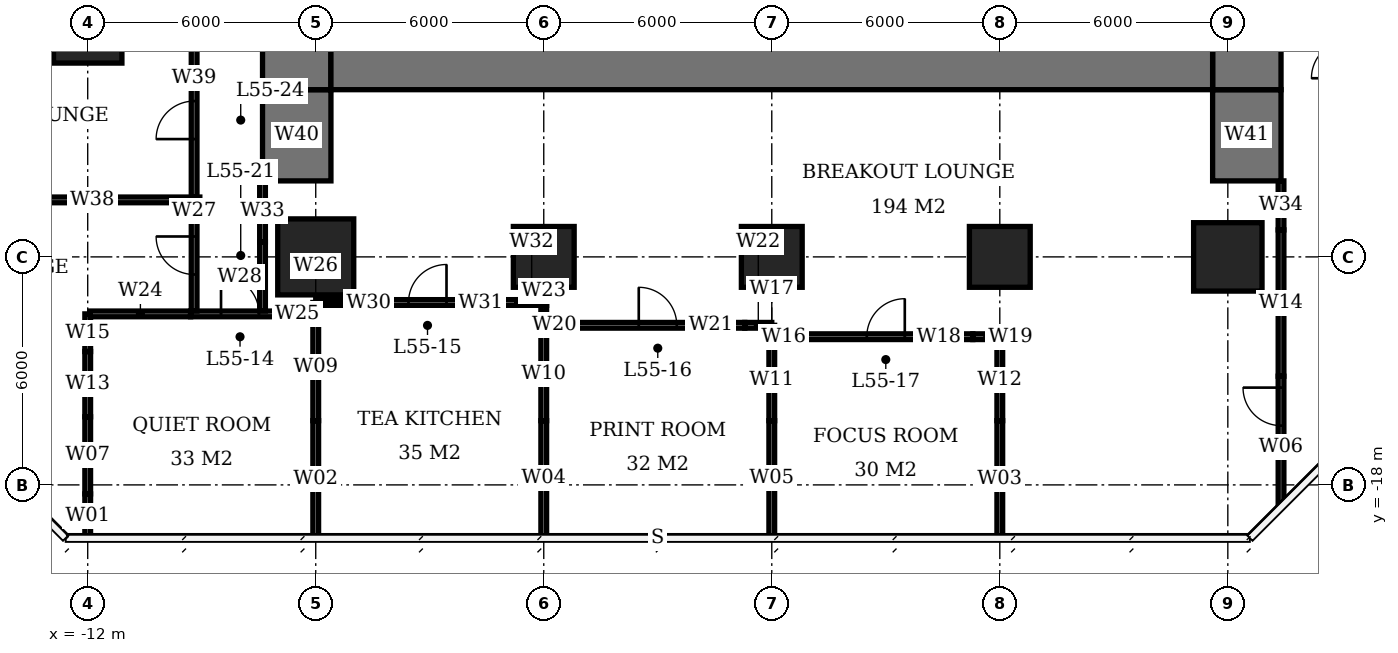
"""IFC4 building model, lengths in metres.
Left out: names, types, materials, properties, quantities, classifications, styles, units other than length and angle.
Written with IfcOpenShell. Run it as: python <this file> out.ifc"""

import sys

from ifc_helpers import new_model, si_unit, direction, frame, frame_2d, origin, origin_2d, place, context, subcontext, project, spatial, rectangle, extrude, element, fill, save


model = new_model("IFC4")
c1 = context("Model", 3, precision=1e-05, world=origin(), true_north=direction((0.0, 1.0)))
c2 = subcontext(c1, "Body", "Model", "MODEL_VIEW")
j1 = project(units=[si_unit("LENGTHUNIT", "METRE"), si_unit("PLANEANGLEUNIT", "RADIAN")], contexts=[c1])
p1 = place(None, origin())
s1 = spatial("IfcSite", under=j1, at=p1, CompositionType="ELEMENT")
p2 = place(p1, origin())
s2 = spatial("IfcBuilding", under=s1, at=p2, CompositionType="ELEMENT")
p3 = place(p2, frame((0.0, 0.0, 224.0)))
s3 = spatial("IfcBuildingStorey", under=s2, at=p3, CompositionType="ELEMENT", Elevation=224.0)
p4 = place(p3, frame((-12.0, -6.0, 0.0), z_axis=(0.0, 0.0, 1.0), x_axis=(1.0, 0.0, 0.0)))
e1 = element("IfcColumn", 1, at=p4, inside=s3, PredefinedType="COLUMN", context=c2, shape_type="SweptSolid", body=[
    extrude(rectangle(XDim=1.8, YDim=1.8, at=origin_2d()), origin(), (0.0, 0.0, 1.0), 3.9),
])
p5 = place(p3, frame((-6.0, -12.0, 0.0), z_axis=(0.0, 0.0, 1.0), x_axis=(1.0, 0.0, 0.0)))
e2 = element("IfcColumn", 2, at=p5, inside=s3, PredefinedType="COLUMN", context=c2, shape_type="SweptSolid", body=[
    extrude(rectangle(XDim=2.0, YDim=2.0, at=origin_2d()), origin(), (0.0, 0.0, 1.0), 3.9),
])
for number, where, z_axis, x_axis in (
    (3, (0.0, -12.0, 0.0), (0.0, 0.0, 1.0), (1.0, 0.0, 0.0)),
    (4, (6.0, -12.0, 0.0), (0.0, 0.0, 1.0), (1.0, 0.0, 0.0)),
    (5, (12.0, -12.0, 0.0), (0.0, 0.0, 1.0), (1.0, 0.0, 0.0)),
):
    element("IfcColumn", number, at=place(p3, frame(where, z_axis=z_axis, x_axis=x_axis)), inside=s3, PredefinedType="COLUMN", context=c2, shape_type="SweptSolid", body=[
        extrude(rectangle(XDim=1.6, YDim=1.6, at=origin_2d()), origin(), (0.0, 0.0, 1.0), 3.9),
    ])
p6 = place(p3, frame((18.0, -12.0, 0.0), z_axis=(0.0, 0.0, 1.0), x_axis=(1.0, 0.0, 0.0)))
e6 = element("IfcColumn", 6, at=p6, inside=s3, PredefinedType="COLUMN", context=c2, shape_type="SweptSolid", body=[
    extrude(rectangle(XDim=1.8, YDim=1.8, at=origin_2d()), origin(), (0.0, 0.0, 1.0), 3.9),
])
p7 = place(p3, frame((-5.6, -6.6, 0.0), z_axis=(0.0, 0.0, 1.0), x_axis=(1.0, 0.0, 0.0)))
e7 = element("IfcWall", 7, at=p7, inside=s3, PredefinedType="SHEAR", context=c2, shape_type="SweptSolid", body=[
    extrude(rectangle(XDim=23.2, YDim=2.0, at=frame_2d((11.6, 0.0))), origin(), (0.0, 0.0, 1.0), 3.9),
])
p8 = place(p3, frame((-6.5, -7.6, 0.0), z_axis=(0.0, 0.0, 1.0), x_axis=(0.0, 1.0, 0.0)))
e8 = element("IfcWall", 8, at=p8, inside=s3, PredefinedType="SHEAR", context=c2, shape_type="SweptSolid", body=[
    extrude(rectangle(XDim=21.2, YDim=1.8, at=frame_2d((10.6, 0.0))), origin(), (0.0, 0.0, 1.0), 3.9),
])
p9 = place(p8, frame((7.8, 0.0, 0.0)))
e9 = element("IfcOpeningElement", 9, at=p9, cuts=e8, PredefinedType="OPENING", context=c2, shape_type="SweptSolid", body=[
    extrude(rectangle(XDim=1.8, YDim=2.4, at=frame_2d((0.9, 1.2))), frame((0.0, 0.91, 0.0), z_axis=(0.0, -1.0, 0.0), x_axis=(1.0, 0.0, 0.0)), (0.0, 0.0, 1.0), 1.82),
])
p10 = place(p3, frame((18.5, -7.6, 0.0), z_axis=(0.0, 0.0, 1.0), x_axis=(0.0, 1.0, 0.0)))
e10 = element("IfcWall", 10, at=p10, inside=s3, PredefinedType="SHEAR", context=c2, shape_type="SweptSolid", body=[
    extrude(rectangle(XDim=21.2, YDim=1.8, at=frame_2d((10.6, 0.0))), origin(), (0.0, 0.0, 1.0), 3.9),
])
p11 = place(p10, frame((9.2, 0.0, 0.0)))
e11 = element("IfcOpeningElement", 11, at=p11, cuts=e10, PredefinedType="OPENING", context=c2, shape_type="SweptSolid", body=[
    extrude(rectangle(XDim=1.8, YDim=2.4, at=frame_2d((0.9, 1.2))), frame((0.0, 0.91, 0.0), z_axis=(0.0, -1.0, 0.0), x_axis=(1.0, 0.0, 0.0)), (0.0, 0.0, 1.0), 1.82),
])
for number, where, z_axis, x_axis in (
    (12, (-6.5, -10.0, 0.0), (0.0, 0.0, 1.0), (0.0, 1.0, 0.0)),
    (13, (18.5, -10.0, 0.0), (0.0, 0.0, 1.0), (0.0, 1.0, 0.0)),
):
    element("IfcWall", number, at=place(p3, frame(where, z_axis=z_axis, x_axis=x_axis)), inside=s3, PredefinedType="SHEAR", context=c2, shape_type="SweptSolid", body=[
        extrude(rectangle(XDim=2.4, YDim=1.8, at=frame_2d((1.2, 0.0))), origin(), (0.0, 0.0, 1.0), 3.9),
    ])
p12 = place(p3, frame((5.925, -14.1, 0.0), z_axis=(0.0, 0.0, 1.0), x_axis=(1.0, 0.0, 0.0)))
e14 = element("IfcWall", 14, at=p12, inside=s3, PredefinedType="PARTITIONING", context=c2, shape_type="SweptSolid", body=[
    extrude(rectangle(XDim=0.785, YDim=0.15, at=frame_2d((0.393, 0.0))), origin(), (0.0, 0.0, 1.0), 2.65),
])
p13 = place(p3, frame((6.71, -14.1, 0.0), z_axis=(0.0, 0.0, 1.0), x_axis=(1.0, 0.0, 0.0)))
e15 = element("IfcWall", 15, at=p13, inside=s3, PredefinedType="PARTITIONING", context=c2, shape_type="SweptSolid", body=[
    extrude(rectangle(XDim=4.58, YDim=0.15, at=frame_2d((2.29, 0.0))), origin(), (0.0, 0.0, 1.0), 3.65),
])
p14 = place(p13, frame((1.79, 0.0, 0.0)))
e16 = element("IfcOpeningElement", 16, at=p14, cuts=e15, PredefinedType="OPENING", context=c2, shape_type="SweptSolid", body=[
    extrude(rectangle(XDim=1.0, YDim=2.1, at=frame_2d((0.5, 1.05))), frame((0.0, 0.085, 0.0), z_axis=(0.0, -1.0, 0.0), x_axis=(1.0, 0.0, 0.0)), (0.0, 0.0, 1.0), 0.17),
])
p15 = place(p3, frame((11.29, -14.1, 0.0), z_axis=(0.0, 0.0, 1.0), x_axis=(1.0, 0.0, 0.0)))
e17 = element("IfcWall", 17, at=p15, inside=s3, PredefinedType="PARTITIONING", context=c2, shape_type="SweptSolid", body=[
    extrude(rectangle(XDim=0.785, YDim=0.15, at=frame_2d((0.393, 0.0))), origin(), (0.0, 0.0, 1.0), 2.65),
])
p16 = place(p3, frame((-0.15, -13.8, 0.0), z_axis=(0.0, 0.0, 1.0), x_axis=(1.0, 0.0, 0.0)))
e18 = element("IfcWall", 18, at=p16, inside=s3, PredefinedType="PARTITIONING", context=c2, shape_type="SweptSolid", body=[
    extrude(rectangle(XDim=0.86, YDim=0.15, at=frame_2d((0.43, 0.0))), origin(), (0.0, 0.0, 1.0), 2.65),
])
p17 = place(p3, frame((0.71, -13.8, 0.0), z_axis=(0.0, 0.0, 1.0), x_axis=(1.0, 0.0, 0.0)))
e19 = element("IfcWall", 19, at=p17, inside=s3, PredefinedType="PARTITIONING", context=c2, shape_type="SweptSolid", body=[
    extrude(rectangle(XDim=4.58, YDim=0.15, at=frame_2d((2.29, 0.0))), origin(), (0.0, 0.0, 1.0), 3.65),
])
p18 = place(p17, frame((1.79, 0.0, 0.0)))
e20 = element("IfcOpeningElement", 20, at=p18, cuts=e19, PredefinedType="OPENING", context=c2, shape_type="SweptSolid", body=[
    extrude(rectangle(XDim=1.0, YDim=2.1, at=frame_2d((0.5, 1.05))), frame((0.0, 0.085, 0.0), z_axis=(0.0, -1.0, 0.0), x_axis=(1.0, 0.0, 0.0)), (0.0, 0.0, 1.0), 0.17),
])
p19 = place(p3, frame((5.29, -13.8, 0.0), z_axis=(0.0, 0.0, 1.0), x_axis=(1.0, 0.0, 0.0)))
e21 = element("IfcWall", 21, at=p19, inside=s3, PredefinedType="PARTITIONING", context=c2, shape_type="SweptSolid", body=[
    extrude(rectangle(XDim=0.71, YDim=0.15, at=frame_2d((0.355, 0.0))), origin(), (0.0, 0.0, 1.0), 2.65),
])
p20 = place(p3, frame((-11.935, -13.5, 0.0), z_axis=(0.0, 0.0, 1.0), x_axis=(1.0, 0.0, 0.0)))
e22 = element("IfcWall", 22, at=p20, inside=s3, PredefinedType="PARTITIONING", context=c2, shape_type="SweptSolid", body=[
    extrude(rectangle(XDim=2.643, YDim=0.15, at=frame_2d((1.322, 0.0))), origin(), (0.0, 0.0, 1.0), 3.65),
])
p21 = place(p3, frame((-9.292, -13.5, 0.0), z_axis=(0.0, 0.0, 1.0), x_axis=(1.0, 0.0, 0.0)))
e23 = element("IfcWall", 23, at=p21, inside=s3, PredefinedType="PARTITIONING", context=c2, shape_type="SweptSolid", body=[
    extrude(rectangle(XDim=3.217, YDim=0.15, at=frame_2d((1.608, 0.0))), origin(), (0.0, 0.0, 1.0), 2.65),
])
p22 = place(p21, frame((0.8, 0.0, 0.0)))
e24 = element("IfcOpeningElement", 24, at=p22, cuts=e23, PredefinedType="OPENING", context=c2, shape_type="SweptSolid", body=[
    extrude(rectangle(XDim=1.0, YDim=2.1, at=frame_2d((0.5, 1.05))), frame((0.0, 0.085, 0.0), z_axis=(0.0, -1.0, 0.0), x_axis=(1.0, 0.0, 0.0)), (0.0, 0.0, 1.0), 0.17),
])
p23 = place(p3, frame((-6.0, -13.2, 0.0), z_axis=(0.0, 0.0, 1.0), x_axis=(1.0, 0.0, 0.0)))
e25 = element("IfcWall", 25, at=p23, inside=s3, PredefinedType="PARTITIONING", context=c2, shape_type="SweptSolid", body=[
    extrude(rectangle(XDim=0.592, YDim=0.15, at=frame_2d((0.296, 0.0))), origin(), (0.0, 0.0, 1.0), 2.65),
])
p24 = place(p3, frame((-5.408, -13.2, 0.0), z_axis=(0.0, 0.0, 1.0), x_axis=(1.0, 0.0, 0.0)))
e26 = element("IfcWall", 26, at=p24, inside=s3, PredefinedType="PARTITIONING", context=c2, shape_type="SweptSolid", body=[
    extrude(rectangle(XDim=4.698, YDim=0.15, at=frame_2d((2.349, 0.0))), origin(), (0.0, 0.0, 1.0), 3.65),
])
p25 = place(p24, frame((1.849, 0.0, 0.0)))
e27 = element("IfcOpeningElement", 27, at=p25, cuts=e26, PredefinedType="OPENING", context=c2, shape_type="SweptSolid", body=[
    extrude(rectangle(XDim=1.0, YDim=2.1, at=frame_2d((0.5, 1.05))), frame((0.0, 0.085, 0.0), z_axis=(0.0, -1.0, 0.0), x_axis=(1.0, 0.0, 0.0)), (0.0, 0.0, 1.0), 0.17),
])
p26 = place(p3, frame((-0.71, -13.2, 0.0), z_axis=(0.0, 0.0, 1.0), x_axis=(1.0, 0.0, 0.0)))
e28 = element("IfcWall", 28, at=p26, inside=s3, PredefinedType="PARTITIONING", context=c2, shape_type="SweptSolid", body=[
    extrude(rectangle(XDim=0.785, YDim=0.15, at=frame_2d((0.393, 0.0))), origin(), (0.0, 0.0, 1.0), 2.65),
])
p27 = place(p3, frame((-12.0, -19.4, 0.0), z_axis=(0.0, 0.0, 1.0), x_axis=(0.0, 1.0, 0.0)))
e29 = element("IfcWall", 29, at=p27, inside=s3, PredefinedType="PARTITIONING", context=c2, shape_type="SweptSolid", body=[
    extrude(rectangle(XDim=1.163, YDim=0.15, at=frame_2d((0.582, 0.0))), origin(), (0.0, 0.0, 1.0), 3.65),
])
p28 = place(p3, frame((-12.0, -18.237, 0.0), z_axis=(0.0, 0.0, 1.0), x_axis=(0.0, 1.0, 0.0)))
e30 = element("IfcWall", 30, at=p28, inside=s3, PredefinedType="PARTITIONING", context=c2, shape_type="SweptSolid", body=[
    extrude(rectangle(XDim=2.029, YDim=0.15, at=frame_2d((1.015, 0.0))), origin(), (0.0, 0.0, 1.0), 2.65),
])
p29 = place(p3, frame((-12.0, -16.208, 0.0), z_axis=(0.0, 0.0, 1.0), x_axis=(0.0, 1.0, 0.0)))
e31 = element("IfcWall", 31, at=p29, inside=s3, PredefinedType="PARTITIONING", context=c2, shape_type="SweptSolid", body=[
    extrude(rectangle(XDim=1.718, YDim=0.15, at=frame_2d((0.859, 0.0))), origin(), (0.0, 0.0, 1.0), 3.65),
])
p30 = place(p3, frame((-12.0, -14.49, 0.0), z_axis=(0.0, 0.0, 1.0), x_axis=(0.0, 1.0, 0.0)))
e32 = element("IfcWall", 32, at=p30, inside=s3, PredefinedType="PARTITIONING", context=c2, shape_type="SweptSolid", body=[
    extrude(rectangle(XDim=0.99, YDim=0.15, at=frame_2d((0.495, 0.0))), origin(), (0.0, 0.0, 1.0), 2.65),
])
p31 = place(p3, frame((-6.0, -19.4, 0.0), z_axis=(0.0, 0.0, 1.0), x_axis=(0.0, 1.0, 0.0)))
e33 = element("IfcWall", 33, at=p31, inside=s3, PredefinedType="PARTITIONING", context=c2, shape_type="SweptSolid", body=[
    extrude(rectangle(XDim=3.09, YDim=0.15, at=frame_2d((1.545, 0.0))), origin(), (0.0, 0.0, 1.0), 3.65),
])
p32 = place(p3, frame((-6.0, -16.31, 0.0), z_axis=(0.0, 0.0, 1.0), x_axis=(0.0, 1.0, 0.0)))
e34 = element("IfcWall", 34, at=p32, inside=s3, PredefinedType="PARTITIONING", context=c2, shape_type="SweptSolid", body=[
    extrude(rectangle(XDim=2.81, YDim=0.15, at=frame_2d((1.405, 0.0))), origin(), (0.0, 0.0, 1.0), 2.65),
])
p33 = place(p3, frame((-6.0, -13.5, 0.0), z_axis=(0.0, 0.0, 1.0), x_axis=(0.0, 1.0, 0.0)))
e35 = element("IfcWall", 35, at=p33, inside=s3, PredefinedType="PARTITIONING", context=c2, shape_type="SweptSolid", body=[
    extrude(rectangle(XDim=0.3, YDim=0.15, at=frame_2d((0.15, 0.0))), origin(), (0.0, 0.0, 1.0), 2.65),
])
p34 = place(p3, frame((0.0, -19.35, 0.0), z_axis=(0.0, 0.0, 1.0), x_axis=(0.0, 1.0, 0.0)))
e36 = element("IfcWall", 36, at=p34, inside=s3, PredefinedType="PARTITIONING", context=c2, shape_type="SweptSolid", body=[
    extrude(rectangle(XDim=3.04, YDim=0.15, at=frame_2d((1.52, 0.0))), origin(), (0.0, 0.0, 1.0), 3.65),
])
p35 = place(p3, frame((0.0, -16.31, 0.0), z_axis=(0.0, 0.0, 1.0), x_axis=(0.0, 1.0, 0.0)))
e37 = element("IfcWall", 37, at=p35, inside=s3, PredefinedType="PARTITIONING", context=c2, shape_type="SweptSolid", body=[
    extrude(rectangle(XDim=2.435, YDim=0.15, at=frame_2d((1.218, 0.0))), origin(), (0.0, 0.0, 1.0), 2.65),
])
p36 = place(p3, frame((0.0, -13.725, 0.0), z_axis=(0.0, 0.0, 1.0), x_axis=(0.0, 1.0, 0.0)))
e38 = element("IfcWall", 38, at=p36, inside=s3, PredefinedType="PARTITIONING", context=c2, shape_type="SweptSolid", body=[
    extrude(rectangle(XDim=0.45, YDim=0.15, at=frame_2d((0.225, 0.0))), origin(), (0.0, 0.0, 1.0), 2.65),
])
p37 = place(p3, frame((6.0, -19.35, 0.0), z_axis=(0.0, 0.0, 1.0), x_axis=(0.0, 1.0, 0.0)))
e39 = element("IfcWall", 39, at=p37, inside=s3, PredefinedType="PARTITIONING", context=c2, shape_type="SweptSolid", body=[
    extrude(rectangle(XDim=3.04, YDim=0.15, at=frame_2d((1.52, 0.0))), origin(), (0.0, 0.0, 1.0), 3.65),
])
p38 = place(p3, frame((6.0, -16.31, 0.0), z_axis=(0.0, 0.0, 1.0), x_axis=(0.0, 1.0, 0.0)))
e40 = element("IfcWall", 40, at=p38, inside=s3, PredefinedType="PARTITIONING", context=c2, shape_type="SweptSolid", body=[
    extrude(rectangle(XDim=2.135, YDim=0.15, at=frame_2d((1.067, 0.0))), origin(), (0.0, 0.0, 1.0), 2.65),
])
p39 = place(p3, frame((6.0, -14.1, 0.0), z_axis=(0.0, 0.0, 1.0), x_axis=(0.0, 1.0, 0.0)))
e41 = element("IfcWall", 41, at=p39, inside=s3, PredefinedType="PARTITIONING", context=c2, shape_type="SweptSolid", body=[
    extrude(rectangle(XDim=0.3, YDim=0.15, at=frame_2d((0.15, 0.0))), origin(), (0.0, 0.0, 1.0), 2.65),
])
p40 = place(p3, frame((12.0, -19.4, 0.0), z_axis=(0.0, 0.0, 1.0), x_axis=(0.0, 1.0, 0.0)))
e42 = element("IfcWall", 42, at=p40, inside=s3, PredefinedType="PARTITIONING", context=c2, shape_type="SweptSolid", body=[
    extrude(rectangle(XDim=3.09, YDim=0.15, at=frame_2d((1.545, 0.0))), origin(), (0.0, 0.0, 1.0), 3.65),
])
p41 = place(p3, frame((12.0, -16.31, 0.0), z_axis=(0.0, 0.0, 1.0), x_axis=(0.0, 1.0, 0.0)))
e43 = element("IfcWall", 43, at=p41, inside=s3, PredefinedType="PARTITIONING", context=c2, shape_type="SweptSolid", body=[
    extrude(rectangle(XDim=2.135, YDim=0.15, at=frame_2d((1.067, 0.0))), origin(), (0.0, 0.0, 1.0), 2.65),
])
p42 = place(p3, frame((-14.708, -10.5, 0.0), z_axis=(0.0, 0.0, 1.0), x_axis=(1.0, 0.0, 0.0)))
e44 = element("IfcWall", 44, at=p42, inside=s3, PredefinedType="PARTITIONING", context=c2, shape_type="SweptSolid", body=[
    extrude(rectangle(XDim=5.658, YDim=0.15, at=frame_2d((2.829, 0.0))), origin(), (0.0, 0.0, 1.0), 3.65),
])
p43 = place(p3, frame((-9.2, -13.425, 0.0), z_axis=(0.0, 0.0, 1.0), x_axis=(0.0, 1.0, 0.0)))
e45 = element("IfcWall", 45, at=p43, inside=s3, PredefinedType="PARTITIONING", context=c2, shape_type="SweptSolid", body=[
    extrude(rectangle(XDim=2.85, YDim=0.15, at=frame_2d((1.425, 0.0))), origin(), (0.0, 0.0, 1.0), 3.65),
])
p44 = place(p43, frame((0.962, 0.0, 0.0)))
e46 = element("IfcOpeningElement", 46, at=p44, cuts=e45, PredefinedType="OPENING", context=c2, shape_type="SweptSolid", body=[
    extrude(rectangle(XDim=1.0, YDim=2.1, at=frame_2d((0.5, 1.05))), frame((0.0, 0.085, 0.0), z_axis=(0.0, -1.0, 0.0), x_axis=(1.0, 0.0, 0.0)), (0.0, 0.0, 1.0), 0.17),
])
p45 = place(p3, frame((-9.2, -10.425, 0.0), z_axis=(0.0, 0.0, 1.0), x_axis=(0.0, 1.0, 0.0)))
e47 = element("IfcWall", 47, at=p45, inside=s3, PredefinedType="PARTITIONING", context=c2, shape_type="SweptSolid", body=[
    extrude(rectangle(XDim=5.85, YDim=0.15, at=frame_2d((2.925, 0.0))), origin(), (0.0, 0.0, 1.0), 3.65),
])
p46 = place(p45, frame((1.525, 0.0, 0.0)))
e48 = element("IfcOpeningElement", 48, at=p46, cuts=e47, PredefinedType="OPENING", context=c2, shape_type="SweptSolid", body=[
    extrude(rectangle(XDim=1.0, YDim=2.1, at=frame_2d((0.5, 1.05))), frame((0.0, 0.085, 0.0), z_axis=(0.0, -1.0, 0.0), x_axis=(1.0, 0.0, 0.0)), (0.0, 0.0, 1.0), 0.17),
])
p47 = place(p3, frame((-7.4, -13.425, 0.0), z_axis=(0.0, 0.0, 1.0), x_axis=(0.0, 1.0, 0.0)))
e49 = element("IfcWall", 49, at=p47, inside=s3, PredefinedType="PARTITIONING", context=c2, shape_type="SweptSolid", body=[
    extrude(rectangle(XDim=1.817, YDim=0.15, at=frame_2d((0.909, 0.0))), origin(), (0.0, 0.0, 1.0), 2.65),
])
p48 = place(p3, frame((-7.4, -11.608, 0.0), z_axis=(0.0, 0.0, 1.0), x_axis=(0.0, 1.0, 0.0)))
e50 = element("IfcWall", 50, at=p48, inside=s3, PredefinedType="PARTITIONING", context=c2, shape_type="SweptSolid", body=[
    extrude(rectangle(XDim=1.608, YDim=0.15, at=frame_2d((0.804, 0.0))), origin(), (0.0, 0.0, 1.0), 3.65),
])
p49 = place(p3, frame((19.4, -18.489, 0.0), z_axis=(0.0, 0.0, 1.0), x_axis=(0.0, 1.0, 0.0)))
e51 = element("IfcWall", 51, at=p49, inside=s3, PredefinedType="PARTITIONING", context=c2, shape_type="SweptSolid", body=[
    extrude(rectangle(XDim=3.349, YDim=0.15, at=frame_2d((1.675, 0.0))), origin(), (0.0, 0.0, 1.0), 3.65),
])
p50 = place(p49, frame((2.049, 0.0, 0.0)))
e52 = element("IfcOpeningElement", 52, at=p50, cuts=e51, PredefinedType="OPENING", context=c2, shape_type="SweptSolid", body=[
    extrude(rectangle(XDim=1.0, YDim=2.1, at=frame_2d((0.5, 1.05))), frame((0.0, 0.085, 0.0), z_axis=(0.0, -1.0, 0.0), x_axis=(1.0, 0.0, 0.0)), (0.0, 0.0, 1.0), 0.17),
])
p51 = place(p3, frame((19.4, -15.14, 0.0), z_axis=(0.0, 0.0, 1.0), x_axis=(0.0, 1.0, 0.0)))
e53 = element("IfcWall", 53, at=p51, inside=s3, PredefinedType="PARTITIONING", context=c2, shape_type="SweptSolid", body=[
    extrude(rectangle(XDim=3.85, YDim=0.15, at=frame_2d((1.925, 0.0))), origin(), (0.0, 0.0, 1.0), 2.65),
])
p52 = place(p3, frame((19.4, -11.29, 0.0), z_axis=(0.0, 0.0, 1.0), x_axis=(0.0, 1.0, 0.0)))
e54 = element("IfcWall", 54, at=p52, inside=s3, PredefinedType="PARTITIONING", context=c2, shape_type="SweptSolid", body=[
    extrude(rectangle(XDim=1.29, YDim=0.15, at=frame_2d((0.645, 0.0))), origin(), (0.0, 0.0, 1.0), 3.65),
])
p53 = place(p22, origin())
e55 = element("IfcDoor", 55, at=p53, inside=s3, OperationType="SINGLE_SWING_LEFT", PredefinedType="DOOR", context=c2, shape_type="SweptSolid", body=[
    extrude(rectangle(XDim=1.0, YDim=2.1, at=frame_2d((0.5, 1.05))), frame((0.0, 0.025, 0.0), z_axis=(0.0, -1.0, 0.0), x_axis=(1.0, 0.0, 0.0)), (0.0, 0.0, 1.0), 0.05),
])
fill(e24, e55)
p54 = place(p25, origin())
e56 = element("IfcDoor", 56, at=p54, inside=s3, OperationType="SINGLE_SWING_RIGHT", PredefinedType="DOOR", context=c2, shape_type="SweptSolid", body=[
    extrude(rectangle(XDim=1.0, YDim=2.1, at=frame_2d((0.5, 1.05))), frame((0.0, 0.025, 0.0), z_axis=(0.0, -1.0, 0.0), x_axis=(1.0, 0.0, 0.0)), (0.0, 0.0, 1.0), 0.05),
])
fill(e27, e56)
p55 = place(p18, origin())
e57 = element("IfcDoor", 57, at=p55, inside=s3, OperationType="SINGLE_SWING_LEFT", PredefinedType="DOOR", context=c2, shape_type="SweptSolid", body=[
    extrude(rectangle(XDim=1.0, YDim=2.1, at=frame_2d((0.5, 1.05))), frame((0.0, 0.025, 0.0), z_axis=(0.0, -1.0, 0.0), x_axis=(1.0, 0.0, 0.0)), (0.0, 0.0, 1.0), 0.05),
])
fill(e20, e57)
p56 = place(p14, origin())
e58 = element("IfcDoor", 58, at=p56, inside=s3, OperationType="SINGLE_SWING_RIGHT", PredefinedType="DOOR", context=c2, shape_type="SweptSolid", body=[
    extrude(rectangle(XDim=1.0, YDim=2.1, at=frame_2d((0.5, 1.05))), frame((0.0, 0.025, 0.0), z_axis=(0.0, -1.0, 0.0), x_axis=(1.0, 0.0, 0.0)), (0.0, 0.0, 1.0), 0.05),
])
fill(e16, e58)
p57 = place(p44, origin())
e59 = element("IfcDoor", 59, at=p57, inside=s3, OperationType="SINGLE_SWING_RIGHT", PredefinedType="DOOR", context=c2, shape_type="SweptSolid", body=[
    extrude(rectangle(XDim=1.0, YDim=2.1, at=frame_2d((0.5, 1.05))), frame((0.0, 0.025, 0.0), z_axis=(0.0, -1.0, 0.0), x_axis=(1.0, 0.0, 0.0)), (0.0, 0.0, 1.0), 0.05),
])
fill(e46, e59)
p58 = place(p50, origin())
e60 = element("IfcDoor", 60, at=p58, inside=s3, OperationType="SINGLE_SWING_RIGHT", PredefinedType="DOOR", context=c2, shape_type="SweptSolid", body=[
    extrude(rectangle(XDim=1.0, YDim=2.1, at=frame_2d((0.5, 1.05))), frame((0.0, 0.025, 0.0), z_axis=(0.0, -1.0, 0.0), x_axis=(1.0, 0.0, 0.0)), (0.0, 0.0, 1.0), 0.05),
])
fill(e52, e60)
p59 = place(p46, origin())
e61 = element("IfcDoor", 61, at=p59, inside=s3, OperationType="SINGLE_SWING_LEFT", PredefinedType="DOOR", context=c2, shape_type="SweptSolid", body=[
    extrude(rectangle(XDim=1.0, YDim=2.1, at=frame_2d((0.5, 1.05))), frame((0.0, 0.025, 0.0), z_axis=(0.0, -1.0, 0.0), x_axis=(1.0, 0.0, 0.0)), (0.0, 0.0, 1.0), 0.05),
])
fill(e48, e61)
save(model, sys.argv[1])
